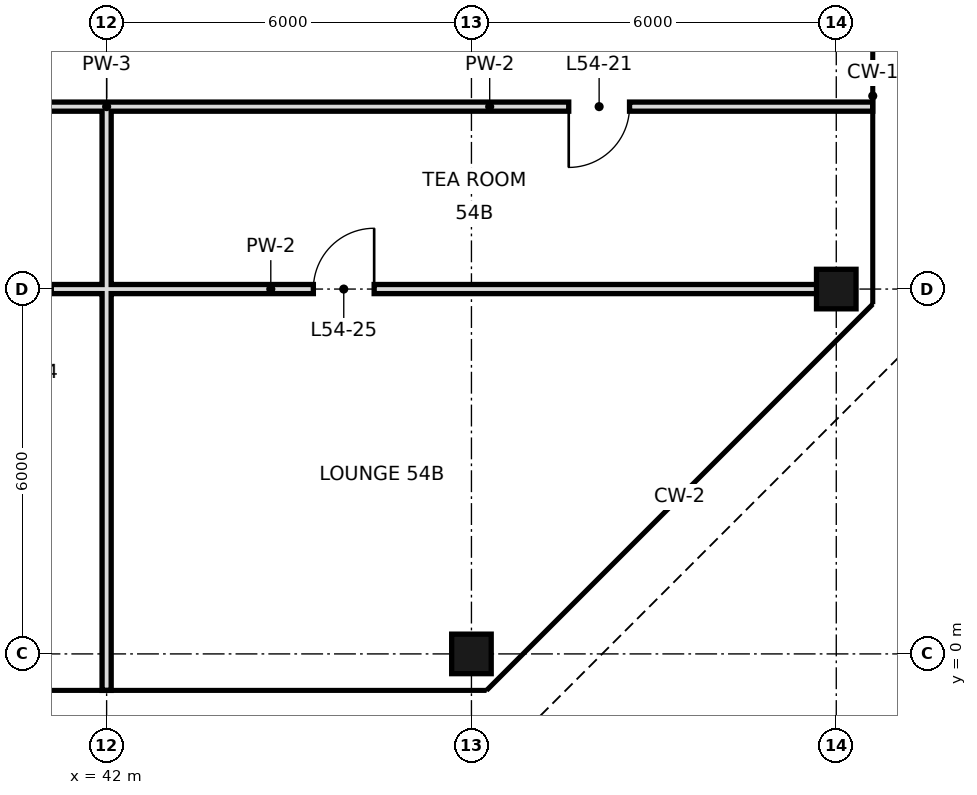
"""IFC4 building model, lengths in metres.
Left out: names, types, materials, properties, quantities, classifications, styles, units other than length and angle.
Written with IfcOpenShell. Run it as: python <this file> out.ifc"""

import sys

from ifc_helpers import new_model, si_unit, direction, frame, frame_2d, origin, origin_2d, place, context, subcontext, project, spatial, rectangle, hollow_rectangle, extrude, element, fill, save


model = new_model("IFC4")
c1 = context("Model", 3, precision=1e-05, world=origin(), true_north=direction((0.0, 1.0)))
c2 = subcontext(c1, "Body", "Model", "MODEL_VIEW")
j1 = project(units=[si_unit("LENGTHUNIT", "METRE"), si_unit("PLANEANGLEUNIT", "RADIAN")], contexts=[c1])
p1 = place(None, origin())
s1 = spatial("IfcSite", under=j1, at=p1, CompositionType="ELEMENT")
p2 = place(p1, origin())
s2 = spatial("IfcBuilding", under=s1, at=p2, CompositionType="ELEMENT")
p3 = place(p2, frame((0.0, 0.0, 229.8)))
s3 = spatial("IfcBuildingStorey", under=s2, at=p3, CompositionType="ELEMENT", Elevation=229.8)
for number, where, z_axis, x_axis in (
    (1, (48.0, 0.0, 0.0), (0.0, 0.0, 1.0), (1.0, 0.0, 0.0)),
    (2, (54.0, 6.0, 0.0), (0.0, 0.0, 1.0), (1.0, 0.0, 0.0)),
):
    element("IfcColumn", number, at=place(p3, frame(where, z_axis=z_axis, x_axis=x_axis)), inside=s3, PredefinedType="COLUMN", context=c2, shape_type="SweptSolid", body=[
        extrude(hollow_rectangle(XDim=0.65, YDim=0.65, WallThickness=0.032, at=origin_2d()), origin(), (0.0, 0.0, 1.0), 4.4),
    ])
p4 = place(p3, frame((42.0, -0.6, 0.0), z_axis=(0.0, 0.0, 1.0), x_axis=(0.0, 1.0, 0.0)))
e3 = element("IfcWall", 3, at=p4, inside=s3, PredefinedType="PARTITIONING", context=c2, shape_type="SweptSolid", body=[
    extrude(rectangle(XDim=6.6, YDim=0.15, at=frame_2d((3.3, 0.0))), origin(), (0.0, 0.0, 1.0), 3.4),
])
p5 = place(p3, frame((42.0, 6.0, 0.0), z_axis=(0.0, 0.0, 1.0), x_axis=(0.0, 1.0, 0.0)))
e4 = element("IfcWall", 4, at=p5, inside=s3, PredefinedType="PARTITIONING", context=c2, shape_type="SweptSolid", body=[
    extrude(rectangle(XDim=3.0, YDim=0.15, at=frame_2d((1.5, 0.0))), origin(), (0.0, 0.0, 1.0), 3.4),
])
p6 = place(p3, frame((42.0, 6.0, 0.0), z_axis=(0.0, 0.0, 1.0), x_axis=(1.0, 0.0, 0.0)))
e5 = element("IfcWall", 5, at=p6, inside=s3, PredefinedType="PARTITIONING", context=c2, shape_type="SweptSolid", body=[
    extrude(rectangle(XDim=12.0, YDim=0.15, at=frame_2d((6.0, 0.0))), origin(), (0.0, 0.0, 1.0), 3.65),
])
p7 = place(p6, frame((3.4, 0.0, 0.0)))
e6 = element("IfcOpeningElement", 6, at=p7, cuts=e5, PredefinedType="OPENING", context=c2, shape_type="SweptSolid", body=[
    extrude(rectangle(XDim=1.0, YDim=2.4, at=frame_2d((0.5, 1.2))), frame((0.0, 0.085, 0.0), z_axis=(0.0, -1.0, 0.0), x_axis=(1.0, 0.0, 0.0)), (0.0, 0.0, 1.0), 0.17),
])
p8 = place(p3, frame((38.4, 6.0, 0.0), z_axis=(0.0, 0.0, 1.0), x_axis=(1.0, 0.0, 0.0)))
e7 = element("IfcWall", 7, at=p8, inside=s3, PredefinedType="PARTITIONING", context=c2, shape_type="SweptSolid", body=[
    extrude(rectangle(XDim=3.6, YDim=0.15, at=frame_2d((1.8, 0.0))), origin(), (0.0, 0.0, 1.0), 3.65),
])
p9 = place(p8, frame((1.79, 0.0, 0.0)))
e8 = element("IfcOpeningElement", 8, at=p9, cuts=e7, PredefinedType="OPENING", context=c2, shape_type="SweptSolid", body=[
    extrude(rectangle(XDim=0.9, YDim=2.4, at=frame_2d((0.45, 1.2))), frame((0.0, 0.085, 0.0), z_axis=(0.0, -1.0, 0.0), x_axis=(1.0, 0.0, 0.0)), (0.0, 0.0, 1.0), 0.17),
])
p10 = place(p3, frame((42.0, 9.0, 0.0), z_axis=(0.0, 0.0, 1.0), x_axis=(1.0, 0.0, 0.0)))
e9 = element("IfcWall", 9, at=p10, inside=s3, PredefinedType="PARTITIONING", context=c2, shape_type="SweptSolid", body=[
    extrude(rectangle(XDim=12.6, YDim=0.15, at=frame_2d((6.3, 0.0))), origin(), (0.0, 0.0, 1.0), 4.1),
])
p11 = place(p10, frame((7.6, 0.0, 0.0)))
e10 = element("IfcOpeningElement", 10, at=p11, cuts=e9, PredefinedType="OPENING", context=c2, shape_type="SweptSolid", body=[
    extrude(rectangle(XDim=1.0, YDim=2.4, at=frame_2d((0.5, 1.2))), frame((0.0, 0.085, 0.0), z_axis=(0.0, -1.0, 0.0), x_axis=(1.0, 0.0, 0.0)), (0.0, 0.0, 1.0), 0.17),
])
p12 = place(p3, frame((38.4, 9.0, 0.0), z_axis=(0.0, 0.0, 1.0), x_axis=(1.0, 0.0, 0.0)))
e11 = element("IfcWall", 11, at=p12, inside=s3, PredefinedType="PARTITIONING", context=c2, shape_type="SweptSolid", body=[
    extrude(rectangle(XDim=3.6, YDim=0.15, at=frame_2d((1.8, 0.0))), origin(), (0.0, 0.0, 1.0), 4.1),
])
p13 = place(p11, frame((1.0, 0.0, 0.0), z_axis=(0.0, 0.0, 1.0), x_axis=(-1.0, 0.0, 0.0)))
e12 = element("IfcDoor", 12, at=p13, inside=s3, OperationType="SINGLE_SWING_RIGHT", PredefinedType="DOOR", context=c2, shape_type="SweptSolid", body=[
    extrude(rectangle(XDim=1.0, YDim=2.4, at=frame_2d((0.5, 1.2))), frame((0.0, 0.025, 0.0), z_axis=(0.0, -1.0, 0.0), x_axis=(1.0, 0.0, 0.0)), (0.0, 0.0, 1.0), 0.05),
])
fill(e10, e12)
p14 = place(p7, frame((1.0, 0.0, 0.0), z_axis=(0.0, 0.0, 1.0), x_axis=(-1.0, 0.0, 0.0)))
e13 = element("IfcDoor", 13, at=p14, inside=s3, OperationType="SINGLE_SWING_LEFT", PredefinedType="DOOR", context=c2, shape_type="SweptSolid", body=[
    extrude(rectangle(XDim=1.0, YDim=2.4, at=frame_2d((0.5, 1.2))), frame((0.0, 0.025, 0.0), z_axis=(0.0, -1.0, 0.0), x_axis=(1.0, 0.0, 0.0)), (0.0, 0.0, 1.0), 0.05),
])
fill(e6, e13)
save(model, sys.argv[1])
